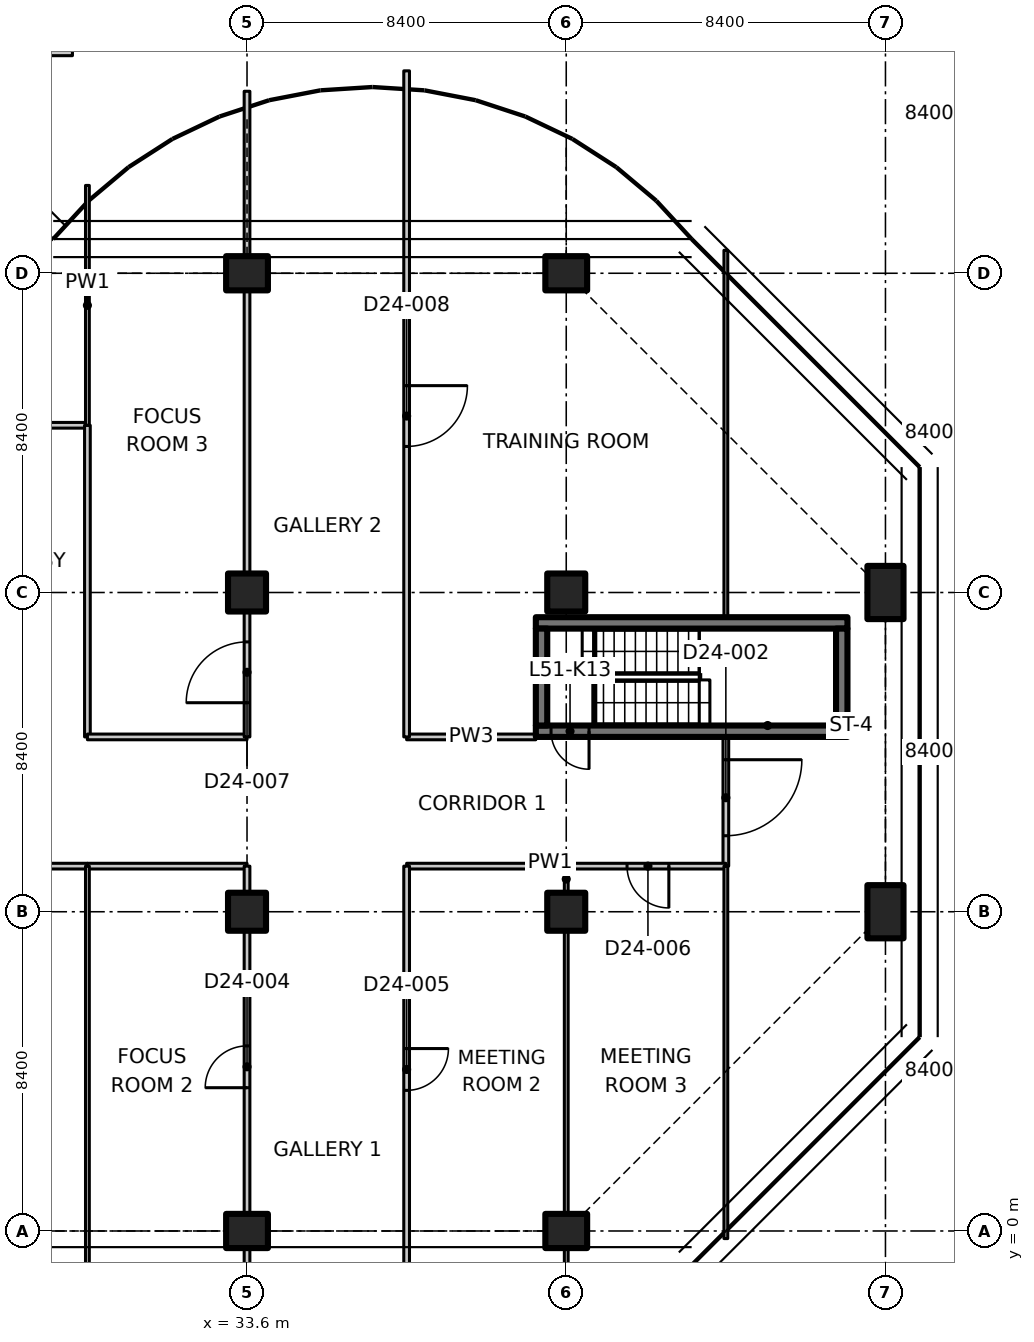
"""IFC4 building model, lengths in metres.
Left out: names, types, materials, properties, quantities, classifications, styles, units other than length and angle.
Written with IfcOpenShell. Run it as: python <this file> out.ifc"""

import sys

from ifc_helpers import new_model, si_unit, direction, frame, frame_2d, origin, origin_2d, place, context, subcontext, project, spatial, polyline, rectangle, outline, extrude, element, fill, save


model = new_model("IFC4")
c1 = context("Model", 3, precision=1e-05, world=origin(), true_north=direction((0.0, 1.0)))
c2 = subcontext(c1, "Body", "Model", "MODEL_VIEW")
j1 = project(units=[si_unit("LENGTHUNIT", "METRE"), si_unit("PLANEANGLEUNIT", "RADIAN")], contexts=[c1])
p1 = place(None, origin())
s1 = spatial("IfcSite", under=j1, at=p1, CompositionType="ELEMENT")
p2 = place(p1, origin())
s2 = spatial("IfcBuilding", under=s1, at=p2, CompositionType="ELEMENT")
p3 = place(p2, frame((0.0, 0.0, 202.8)))
s3 = spatial("IfcBuildingStorey", under=s2, at=p3, CompositionType="ELEMENT", Elevation=202.8)
p4 = place(p3, frame((33.6, 0.0, 0.0), z_axis=(0.0, 0.0, 1.0), x_axis=(0.0, 1.0, 0.0)))
e1 = element("IfcColumn", 1, at=p4, inside=s3, PredefinedType="COLUMN", context=c2, shape_type="SweptSolid", body=[
    extrude(rectangle(XDim=0.9, YDim=1.1, at=origin_2d()), origin(), (0.0, 0.0, 1.0), 3.3),
])
for number, where, z_axis, x_axis in (
    (2, (33.6, 8.4, 0.0), (0.0, 0.0, 1.0), (1.0, 0.0, 0.0)),
    (3, (33.6, 16.8, 0.0), (0.0, 0.0, 1.0), (1.0, 0.0, 0.0)),
):
    element("IfcColumn", number, at=place(p3, frame(where, z_axis=z_axis, x_axis=x_axis)), inside=s3, PredefinedType="COLUMN", context=c2, shape_type="SweptSolid", body=[
        extrude(rectangle(XDim=1.0, YDim=1.0, at=origin_2d()), origin(), (0.0, 0.0, 1.0), 3.3),
    ])
for number, where, z_axis, x_axis in (
    (4, (33.6, 25.2, 0.0), (0.0, 0.0, 1.0), (0.0, 1.0, 0.0)),
    (5, (42.0, 0.0, 0.0), (0.0, 0.0, 1.0), (0.0, 1.0, 0.0)),
):
    element("IfcColumn", number, at=place(p3, frame(where, z_axis=z_axis, x_axis=x_axis)), inside=s3, PredefinedType="COLUMN", context=c2, shape_type="SweptSolid", body=[
        extrude(rectangle(XDim=0.9, YDim=1.1, at=origin_2d()), origin(), (0.0, 0.0, 1.0), 3.3),
    ])
for number, where, z_axis, x_axis in (
    (6, (42.0, 8.4, 0.0), (0.0, 0.0, 1.0), (1.0, 0.0, 0.0)),
    (7, (42.0, 16.8, 0.0), (0.0, 0.0, 1.0), (1.0, 0.0, 0.0)),
):
    element("IfcColumn", number, at=place(p3, frame(where, z_axis=z_axis, x_axis=x_axis)), inside=s3, PredefinedType="COLUMN", context=c2, shape_type="SweptSolid", body=[
        extrude(rectangle(XDim=1.0, YDim=1.0, at=origin_2d()), origin(), (0.0, 0.0, 1.0), 3.3),
    ])
p5 = place(p3, frame((42.0, 25.2, 0.0), z_axis=(0.0, 0.0, 1.0), x_axis=(0.0, 1.0, 0.0)))
e8 = element("IfcColumn", 8, at=p5, inside=s3, PredefinedType="COLUMN", context=c2, shape_type="SweptSolid", body=[
    extrude(rectangle(XDim=0.9, YDim=1.1, at=origin_2d()), origin(), (0.0, 0.0, 1.0), 3.3),
])
for number, where, z_axis, x_axis in (
    (9, (50.4, 8.4, 0.0), (0.0, 0.0, 1.0), (1.0, 0.0, 0.0)),
    (10, (50.4, 16.8, 0.0), (0.0, 0.0, 1.0), (1.0, 0.0, 0.0)),
):
    element("IfcColumn", number, at=place(p3, frame(where, z_axis=z_axis, x_axis=x_axis)), inside=s3, PredefinedType="COLUMN", context=c2, shape_type="SweptSolid", body=[
        extrude(rectangle(XDim=0.95, YDim=1.4, at=origin_2d()), origin(), (0.0, 0.0, 1.0), 3.3),
    ])
p6 = place(p3, frame((49.4, 13.15, 0.0), z_axis=(0.0, 0.0, 1.0), x_axis=(-1.0, 0.0, 0.0)))
e11 = element("IfcWall", 11, at=p6, inside=s3, PredefinedType="SHEAR", context=c2, shape_type="SweptSolid", body=[
    extrude(rectangle(XDim=8.2, YDim=0.3, at=frame_2d((4.1, 0.0))), origin(), (0.0, 0.0, 1.0), 3.3),
])
p7 = place(p6, frame((6.8, 0.0, 0.0)))
e12 = element("IfcOpeningElement", 12, at=p7, cuts=e11, PredefinedType="OPENING", context=c2, shape_type="SweptSolid", body=[
    extrude(rectangle(XDim=1.0, YDim=2.1, at=frame_2d((0.5, 1.05))), frame((0.0, 0.16, 0.0), z_axis=(0.0, -1.0, 0.0), x_axis=(1.0, 0.0, 0.0)), (0.0, 0.0, 1.0), 0.32),
])
p8 = place(p3, frame((41.2, 16.0, 0.0), z_axis=(0.0, 0.0, 1.0), x_axis=(1.0, 0.0, 0.0)))
e13 = element("IfcWall", 13, at=p8, inside=s3, PredefinedType="SHEAR", context=c2, shape_type="SweptSolid", body=[
    extrude(rectangle(XDim=8.2, YDim=0.3, at=frame_2d((4.1, 0.0))), origin(), (0.0, 0.0, 1.0), 3.3),
])
for number, where, z_axis, x_axis in (
    (14, (41.35, 13.3, 0.0), (0.0, 0.0, 1.0), (0.0, 1.0, 0.0)),
    (15, (49.25, 13.3, 0.0), (0.0, 0.0, 1.0), (0.0, 1.0, 0.0)),
):
    element("IfcWall", number, at=place(p3, frame(where, z_axis=z_axis, x_axis=x_axis)), inside=s3, PredefinedType="SHEAR", context=c2, shape_type="SweptSolid", body=[
        extrude(rectangle(XDim=2.55, YDim=0.3, at=frame_2d((1.275, 0.0))), origin(), (0.0, 0.0, 1.0), 3.3),
    ])
p9 = place(p3, frame((25.2, 21.2, 0.0), z_axis=(0.0, 0.0, 1.0), x_axis=(1.0, 0.0, 0.0)))
e16 = element("IfcWall", 16, at=p9, inside=s3, PredefinedType="PARTITIONING", context=c2, shape_type="SweptSolid", body=[
    extrude(rectangle(XDim=4.2, YDim=0.15, at=frame_2d((2.1, 0.0))), origin(), (0.0, 0.0, 1.0), 3.28),
])
p10 = place(p3, frame((29.4, 9.6, 0.0), z_axis=(0.0, 0.0, 1.0), x_axis=(-1.0, 0.0, 0.0)))
e17 = element("IfcWall", 17, at=p10, inside=s3, PredefinedType="PARTITIONING", context=c2, shape_type="SweptSolid", body=[
    extrude(rectangle(XDim=4.2, YDim=0.15, at=frame_2d((2.1, 0.0))), origin(), (0.0, 0.0, 1.0), 3.28),
])
p11 = place(p10, frame((1.5, 0.0, 0.0)))
e18 = element("IfcOpeningElement", 18, at=p11, cuts=e17, PredefinedType="OPENING", context=c2, shape_type="SweptSolid", body=[
    extrude(rectangle(XDim=1.1, YDim=2.1, at=frame_2d((0.55, 1.05))), frame((0.0, 0.085, 0.0), z_axis=(0.0, -1.0, 0.0), x_axis=(1.0, 0.0, 0.0)), (0.0, 0.0, 1.0), 0.17),
])
p12 = place(p3, frame((29.4, 21.2, 0.0), z_axis=(0.0, 0.0, 1.0), x_axis=(0.0, -1.0, 0.0)))
e19 = element("IfcWall", 19, at=p12, inside=s3, PredefinedType="PARTITIONING", context=c2, shape_type="SweptSolid", body=[
    extrude(rectangle(XDim=8.2, YDim=0.15, at=frame_2d((4.1, 0.0))), origin(), (0.0, 0.0, 1.0), 3.28),
])
p13 = place(p3, frame((29.4, 27.511, 0.0), z_axis=(0.0, 0.0, 1.0), x_axis=(0.0, -1.0, 0.0)))
e20 = element("IfcWall", 20, at=p13, inside=s3, PredefinedType="PARTITIONING", context=c2, shape_type="SweptSolid", body=[
    extrude(outline(polyline([(0.0, 0.0), (6.311, 0.0), (6.311, 3.28), (2.761, 3.28), (2.759, 2.93), (1.863, 2.93), (1.861, 3.28), (0.236, 3.28), (0.0, 3.28), (0.0, 0.0)])), frame((0.0, 0.05, 0.0), z_axis=(0.0, -1.0, 0.0), x_axis=(1.0, 0.0, 0.0)), (0.0, 0.0, 1.0), 0.1),
])
p14 = place(p3, frame((25.2, 31.0, 0.0), z_axis=(0.0, 0.0, 1.0), x_axis=(1.0, 0.0, 0.0)))
e21 = element("IfcWall", 21, at=p14, inside=s3, PredefinedType="PARTITIONING", context=c2, shape_type="SweptSolid", body=[
    extrude(rectangle(XDim=3.806, YDim=0.15, at=frame_2d((1.903, 0.0))), origin(), (0.0, 0.0, 1.0), 2.93),
])
p15 = place(p3, frame((46.2, 13.0, 0.0), z_axis=(0.0, 0.0, 1.0), x_axis=(0.0, -1.0, 0.0)))
e22 = element("IfcWall", 22, at=p15, inside=s3, PredefinedType="PARTITIONING", context=c2, shape_type="SweptSolid", body=[
    extrude(rectangle(XDim=3.4, YDim=0.15, at=frame_2d((1.7, 0.0))), origin(), (0.0, 0.0, 1.0), 3.28),
])
p16 = place(p15, frame((0.6, 0.0, 0.0)))
e23 = element("IfcOpeningElement", 23, at=p16, cuts=e22, PredefinedType="OPENING", context=c2, shape_type="SweptSolid", body=[
    extrude(rectangle(XDim=2.0, YDim=2.4, at=frame_2d((1.0, 1.2))), frame((0.0, 0.085, 0.0), z_axis=(0.0, -1.0, 0.0), x_axis=(1.0, 0.0, 0.0)), (0.0, 0.0, 1.0), 0.17),
])
p17 = place(p3, frame((33.6, 9.6, 0.0), z_axis=(0.0, 0.0, 1.0), x_axis=(-1.0, 0.0, 0.0)))
e24 = element("IfcWall", 24, at=p17, inside=s3, PredefinedType="PARTITIONING", context=c2, shape_type="SweptSolid", body=[
    extrude(rectangle(XDim=4.2, YDim=0.15, at=frame_2d((2.1, 0.0))), origin(), (0.0, 0.0, 1.0), 3.28),
])
p18 = place(p3, frame((42.0, 9.6, 0.0), z_axis=(0.0, 0.0, 1.0), x_axis=(-1.0, 0.0, 0.0)))
e25 = element("IfcWall", 25, at=p18, inside=s3, PredefinedType="PARTITIONING", context=c2, shape_type="SweptSolid", body=[
    extrude(rectangle(XDim=4.2, YDim=0.15, at=frame_2d((2.1, 0.0))), origin(), (0.0, 0.0, 1.0), 3.28),
])
p19 = place(p3, frame((46.2, 9.6, 0.0), z_axis=(0.0, 0.0, 1.0), x_axis=(-1.0, 0.0, 0.0)))
e26 = element("IfcWall", 26, at=p19, inside=s3, PredefinedType="PARTITIONING", context=c2, shape_type="SweptSolid", body=[
    extrude(rectangle(XDim=4.2, YDim=0.15, at=frame_2d((2.1, 0.0))), origin(), (0.0, 0.0, 1.0), 3.28),
])
p20 = place(p19, frame((1.5, 0.0, 0.0)))
e27 = element("IfcOpeningElement", 27, at=p20, cuts=e26, PredefinedType="OPENING", context=c2, shape_type="SweptSolid", body=[
    extrude(rectangle(XDim=1.1, YDim=2.1, at=frame_2d((0.55, 1.05))), frame((0.0, 0.085, 0.0), z_axis=(0.0, -1.0, 0.0), x_axis=(1.0, 0.0, 0.0)), (0.0, 0.0, 1.0), 0.17),
])
p21 = place(p3, frame((29.4, 13.0, 0.0), z_axis=(0.0, 0.0, 1.0), x_axis=(1.0, 0.0, 0.0)))
e28 = element("IfcWall", 28, at=p21, inside=s3, PredefinedType="PARTITIONING", context=c2, shape_type="SweptSolid", body=[
    extrude(rectangle(XDim=4.2, YDim=0.15, at=frame_2d((2.1, 0.0))), origin(), (0.0, 0.0, 1.0), 3.28),
])
p22 = place(p3, frame((37.8, 13.0, 0.0), z_axis=(0.0, 0.0, 1.0), x_axis=(1.0, 0.0, 0.0)))
e29 = element("IfcWall", 29, at=p22, inside=s3, PredefinedType="PARTITIONING", context=c2, shape_type="SweptSolid", body=[
    extrude(rectangle(XDim=3.4, YDim=0.15, at=frame_2d((1.7, 0.0))), origin(), (0.0, 0.0, 1.0), 3.28),
])
p23 = place(p3, frame((46.2, -0.2, 0.0), z_axis=(0.0, 0.0, 1.0), x_axis=(0.0, 1.0, 0.0)))
e30 = element("IfcWall", 30, at=p23, inside=s3, PredefinedType="PARTITIONING", context=c2, shape_type="SweptSolid", body=[
    extrude(outline(polyline([(0.0, 0.0), (9.8, 0.0), (9.8, 3.28), (5.066, 3.28), (5.064, 2.93), (3.736, 2.93), (3.734, 3.28), (0.0, 3.28), (0.0, 0.0)])), frame((0.0, 0.05, 0.0), z_axis=(0.0, -1.0, 0.0), x_axis=(1.0, 0.0, 0.0)), (0.0, 0.0, 1.0), 0.1),
])
p24 = place(p3, frame((46.2, 16.15, 0.0), z_axis=(0.0, 0.0, 1.0), x_axis=(0.0, 1.0, 0.0)))
e31 = element("IfcWall", 31, at=p24, inside=s3, PredefinedType="PARTITIONING", context=c2, shape_type="SweptSolid", body=[
    extrude(outline(polyline([(0.0, 0.0), (9.656, 0.0), (9.656, 3.28), (9.25, 3.28), (5.516, 3.28), (5.514, 2.93), (4.186, 2.93), (4.184, 3.28), (0.0, 3.28), (0.0, 0.0)])), frame((0.0, 0.05, 0.0), z_axis=(0.0, -1.0, 0.0), x_axis=(1.0, 0.0, 0.0)), (0.0, 0.0, 1.0), 0.1),
])
p25 = place(p3, frame((33.6, -1.1, 0.0), z_axis=(0.0, 0.0, 1.0), x_axis=(0.0, 1.0, 0.0)))
e32 = element("IfcWall", 32, at=p25, inside=s3, PredefinedType="PARTITIONING", context=c2, shape_type="SweptSolid", body=[
    extrude(rectangle(XDim=0.63, YDim=0.15, at=frame_2d((0.315, 0.0))), origin(), (0.0, 0.0, 1.0), 3.28),
])
p26 = place(p3, frame((33.6, 0.47, 0.0), z_axis=(0.0, 0.0, 1.0), x_axis=(0.0, 1.0, 0.0)))
e33 = element("IfcWall", 33, at=p26, inside=s3, PredefinedType="PARTITIONING", context=c2, shape_type="SweptSolid", body=[
    extrude(rectangle(XDim=7.41, YDim=0.15, at=frame_2d((3.705, 0.0))), origin(), (0.0, 0.0, 1.0), 3.28),
])
p27 = place(p26, frame((3.3, 0.0, 0.0)))
e34 = element("IfcOpeningElement", 34, at=p27, cuts=e33, PredefinedType="OPENING", context=c2, shape_type="SweptSolid", body=[
    extrude(rectangle(XDim=1.1, YDim=2.1, at=frame_2d((0.55, 1.05))), frame((0.0, 0.085, 0.0), z_axis=(0.0, -1.0, 0.0), x_axis=(1.0, 0.0, 0.0)), (0.0, 0.0, 1.0), 0.17),
])
p28 = place(p3, frame((33.6, 8.92, 0.0), z_axis=(0.0, 0.0, 1.0), x_axis=(0.0, 1.0, 0.0)))
e35 = element("IfcWall", 35, at=p28, inside=s3, PredefinedType="PARTITIONING", context=c2, shape_type="SweptSolid", body=[
    extrude(rectangle(XDim=0.68, YDim=0.15, at=frame_2d((0.34, 0.0))), origin(), (0.0, 0.0, 1.0), 3.28),
])
p29 = place(p3, frame((37.8, 9.6, 0.0), z_axis=(0.0, 0.0, 1.0), x_axis=(0.0, -1.0, 0.0)))
e36 = element("IfcWall", 36, at=p29, inside=s3, PredefinedType="PARTITIONING", context=c2, shape_type="SweptSolid", body=[
    extrude(outline(polyline([(0.0, 0.0), (10.774, 0.0), (10.774, 3.28), (10.7, 3.28), (10.05, 3.28), (10.048, 2.93), (9.152, 2.93), (9.15, 3.28), (0.0, 3.28), (0.0, 0.0)])), frame((0.0, 0.075, 0.0), z_axis=(0.0, -1.0, 0.0), x_axis=(1.0, 0.0, 0.0)), (0.0, 0.0, 1.0), 0.15),
])
p30 = place(p29, frame((4.8, 0.0, 0.0)))
e37 = element("IfcOpeningElement", 37, at=p30, cuts=e36, PredefinedType="OPENING", context=c2, shape_type="SweptSolid", body=[
    extrude(rectangle(XDim=1.1, YDim=2.1, at=frame_2d((0.55, 1.05))), frame((0.0, 0.085, 0.0), z_axis=(0.0, -1.0, 0.0), x_axis=(1.0, 0.0, 0.0)), (0.0, 0.0, 1.0), 0.17),
])
p31 = place(p3, frame((29.4, 9.6, 0.0), z_axis=(0.0, 0.0, 1.0), x_axis=(0.0, -1.0, 0.0)))
e38 = element("IfcWall", 38, at=p31, inside=s3, PredefinedType="PARTITIONING", context=c2, shape_type="SweptSolid", body=[
    extrude(outline(polyline([(0.0, 0.0), (10.774, 0.0), (10.774, 3.28), (10.7, 3.28), (10.05, 3.28), (10.048, 2.93), (9.152, 2.93), (9.15, 3.28), (0.0, 3.28), (0.0, 0.0)])), frame((0.0, 0.05, 0.0), z_axis=(0.0, -1.0, 0.0), x_axis=(1.0, 0.0, 0.0)), (0.0, 0.0, 1.0), 0.1),
])
p32 = place(p3, frame((42.0, 9.6, 0.0), z_axis=(0.0, 0.0, 1.0), x_axis=(0.0, -1.0, 0.0)))
e39 = element("IfcWall", 39, at=p32, inside=s3, PredefinedType="PARTITIONING", context=c2, shape_type="SweptSolid", body=[
    extrude(rectangle(XDim=0.68, YDim=0.1, at=frame_2d((0.34, 0.0))), origin(), (0.0, 0.0, 1.0), 3.28),
])
p33 = place(p3, frame((42.0, 7.88, 0.0), z_axis=(0.0, 0.0, 1.0), x_axis=(0.0, -1.0, 0.0)))
e40 = element("IfcWall", 40, at=p33, inside=s3, PredefinedType="PARTITIONING", context=c2, shape_type="SweptSolid", body=[
    extrude(outline(polyline([(0.0, 0.0), (7.41, 0.0), (7.41, 2.93), (7.216, 2.93), (7.214, 3.28), (0.0, 3.28), (0.0, 0.0)])), frame((0.0, 0.05, 0.0), z_axis=(0.0, -1.0, 0.0), x_axis=(1.0, 0.0, 0.0)), (0.0, 0.0, 1.0), 0.1),
])
p34 = place(p3, frame((42.0, -0.47, 0.0), z_axis=(0.0, 0.0, 1.0), x_axis=(0.0, -1.0, 0.0)))
e41 = element("IfcWall", 41, at=p34, inside=s3, PredefinedType="PARTITIONING", context=c2, shape_type="SweptSolid", body=[
    extrude(rectangle(XDim=0.63, YDim=0.1, at=frame_2d((0.315, 0.0))), origin(), (0.0, 0.0, 1.0), 3.28),
])
p35 = place(p3, frame((33.6, 13.0, 0.0), z_axis=(0.0, 0.0, 1.0), x_axis=(0.0, 1.0, 0.0)))
e42 = element("IfcWall", 42, at=p35, inside=s3, PredefinedType="PARTITIONING", context=c2, shape_type="SweptSolid", body=[
    extrude(rectangle(XDim=3.28, YDim=0.15, at=frame_2d((1.64, 0.0))), origin(), (0.0, 0.0, 1.0), 3.28),
])
p36 = place(p35, frame((0.9, 0.0, 0.0)))
e43 = element("IfcOpeningElement", 43, at=p36, cuts=e42, PredefinedType="OPENING", context=c2, shape_type="SweptSolid", body=[
    extrude(rectangle(XDim=1.6, YDim=2.1, at=frame_2d((0.8, 1.05))), frame((0.0, 0.085, 0.0), z_axis=(0.0, -1.0, 0.0), x_axis=(1.0, 0.0, 0.0)), (0.0, 0.0, 1.0), 0.17),
])
p37 = place(p3, frame((33.6, 17.32, 0.0), z_axis=(0.0, 0.0, 1.0), x_axis=(0.0, 1.0, 0.0)))
e44 = element("IfcWall", 44, at=p37, inside=s3, PredefinedType="PARTITIONING", context=c2, shape_type="SweptSolid", body=[
    extrude(rectangle(XDim=7.41, YDim=0.15, at=frame_2d((3.705, 0.0))), origin(), (0.0, 0.0, 1.0), 3.28),
])
p38 = place(p3, frame((33.6, 25.67, 0.0), z_axis=(0.0, 0.0, 1.0), x_axis=(0.0, 1.0, 0.0)))
e45 = element("IfcWall", 45, at=p38, inside=s3, PredefinedType="PARTITIONING", context=c2, shape_type="SweptSolid", body=[
    extrude(rectangle(XDim=4.318, YDim=0.15, at=frame_2d((2.159, 0.0))), origin(), (0.0, 0.0, 1.0), 2.93),
])
p39 = place(p3, frame((37.8, 30.526, 0.0), z_axis=(0.0, 0.0, 1.0), x_axis=(0.0, -1.0, 0.0)))
e46 = element("IfcWall", 46, at=p39, inside=s3, PredefinedType="PARTITIONING", context=c2, shape_type="SweptSolid", body=[
    extrude(outline(polyline([(0.0, 0.0), (17.526, 0.0), (17.526, 3.28), (5.776, 3.28), (5.774, 2.93), (4.878, 2.93), (4.876, 3.28), (0.283, 3.28), (0.0, 3.28), (0.0, 0.0)])), frame((0.0, 0.075, 0.0), z_axis=(0.0, -1.0, 0.0), x_axis=(1.0, 0.0, 0.0)), (0.0, 0.0, 1.0), 0.15),
])
p40 = place(p39, frame((8.283, 0.0, 0.0)))
e47 = element("IfcOpeningElement", 47, at=p40, cuts=e46, PredefinedType="OPENING", context=c2, shape_type="SweptSolid", body=[
    extrude(rectangle(XDim=1.6, YDim=2.1, at=frame_2d((0.8, 1.05))), frame((0.0, 0.085, 0.0), z_axis=(0.0, -1.0, 0.0), x_axis=(1.0, 0.0, 0.0)), (0.0, 0.0, 1.0), 0.17),
])
p41 = place(p7, origin())
e48 = element("IfcDoor", 48, at=p41, inside=s3, OperationType="SINGLE_SWING_LEFT", PredefinedType="DOOR", context=c2, shape_type="SweptSolid", body=[
    extrude(rectangle(XDim=1.0, YDim=2.1, at=frame_2d((0.5, 1.05))), frame((0.0, 0.025, 0.0), z_axis=(0.0, -1.0, 0.0), x_axis=(1.0, 0.0, 0.0)), (0.0, 0.0, 1.0), 0.05),
])
fill(e12, e48)
p42 = place(p16, origin())
e49 = element("IfcDoor", 49, at=p42, inside=s3, OperationType="DOUBLE_DOOR_SINGLE_SWING", PredefinedType="DOOR", context=c2, shape_type="SweptSolid", body=[
    extrude(rectangle(XDim=2.0, YDim=2.4, at=frame_2d((1.0, 1.2))), frame((0.0, 0.025, 0.0), z_axis=(0.0, -1.0, 0.0), x_axis=(1.0, 0.0, 0.0)), (0.0, 0.0, 1.0), 0.05),
])
fill(e23, e49)
p43 = place(p27, origin())
e50 = element("IfcDoor", 50, at=p43, inside=s3, OperationType="SINGLE_SWING_LEFT", PredefinedType="DOOR", context=c2, shape_type="SweptSolid", body=[
    extrude(rectangle(XDim=1.1, YDim=2.1, at=frame_2d((0.55, 1.05))), frame((0.0, 0.025, 0.0), z_axis=(0.0, -1.0, 0.0), x_axis=(1.0, 0.0, 0.0)), (0.0, 0.0, 1.0), 0.05),
])
fill(e34, e50)
p44 = place(p30, origin())
e51 = element("IfcDoor", 51, at=p44, inside=s3, OperationType="SINGLE_SWING_LEFT", PredefinedType="DOOR", context=c2, shape_type="SweptSolid", body=[
    extrude(rectangle(XDim=1.1, YDim=2.1, at=frame_2d((0.55, 1.05))), frame((0.0, 0.025, 0.0), z_axis=(0.0, -1.0, 0.0), x_axis=(1.0, 0.0, 0.0)), (0.0, 0.0, 1.0), 0.05),
])
fill(e37, e51)
p45 = place(p20, origin())
e52 = element("IfcDoor", 52, at=p45, inside=s3, OperationType="SINGLE_SWING_LEFT", PredefinedType="DOOR", context=c2, shape_type="SweptSolid", body=[
    extrude(rectangle(XDim=1.1, YDim=2.1, at=frame_2d((0.55, 1.05))), frame((0.0, 0.025, 0.0), z_axis=(0.0, -1.0, 0.0), x_axis=(1.0, 0.0, 0.0)), (0.0, 0.0, 1.0), 0.05),
])
fill(e27, e52)
p46 = place(p36, origin())
e53 = element("IfcDoor", 53, at=p46, inside=s3, OperationType="DOUBLE_DOOR_SINGLE_SWING", PredefinedType="DOOR", context=c2, shape_type="SweptSolid", body=[
    extrude(rectangle(XDim=1.6, YDim=2.1, at=frame_2d((0.8, 1.05))), frame((0.0, 0.025, 0.0), z_axis=(0.0, -1.0, 0.0), x_axis=(1.0, 0.0, 0.0)), (0.0, 0.0, 1.0), 0.05),
])
fill(e43, e53)
p47 = place(p40, origin())
e54 = element("IfcDoor", 54, at=p47, inside=s3, OperationType="DOUBLE_DOOR_SINGLE_SWING", PredefinedType="DOOR", context=c2, shape_type="SweptSolid", body=[
    extrude(rectangle(XDim=1.6, YDim=2.1, at=frame_2d((0.8, 1.05))), frame((0.0, 0.025, 0.0), z_axis=(0.0, -1.0, 0.0), x_axis=(1.0, 0.0, 0.0)), (0.0, 0.0, 1.0), 0.05),
])
fill(e47, e54)
save(model, sys.argv[1])
